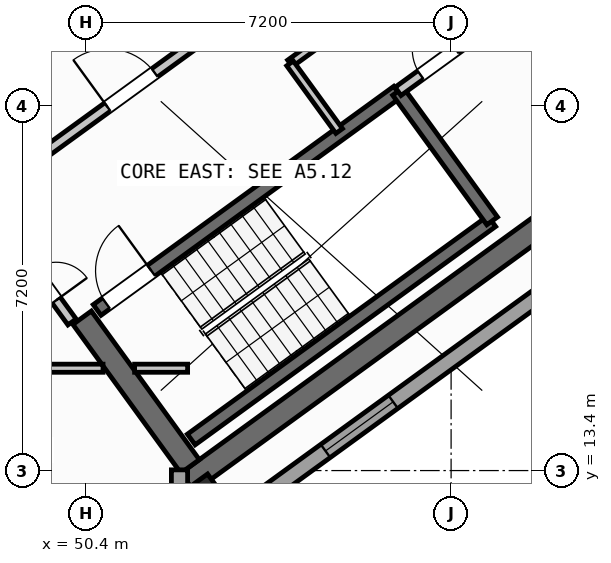
"""IFC4 building model, lengths in metres.
Left out: names, types, materials, properties, quantities, classifications, styles, units other than length and angle.
Written with IfcOpenShell. Run it as: python <this file> out.ifc"""

import sys

from ifc_helpers import new_model, si_unit, direction, frame, frame_2d, origin, origin_2d, place, context, subcontext, project, spatial, rectangle, hollow_rectangle, extrude, source, transform, mapped, element, fill, save


model = new_model("IFC4")
c1 = context("Model", 3, precision=1e-05, world=origin(), true_north=direction((0.0, 1.0)))
c2 = subcontext(c1, "Body", "Model", "MODEL_VIEW")
j1 = project(units=[si_unit("LENGTHUNIT", "METRE"), si_unit("PLANEANGLEUNIT", "RADIAN")], contexts=[c1])
p1 = place(None, origin())
s1 = spatial("IfcSite", under=j1, at=p1, CompositionType="ELEMENT")
p2 = place(p1, origin())
s2 = spatial("IfcBuilding", under=s1, at=p2, CompositionType="ELEMENT")
p3 = place(p2, frame((0.0, 0.0, 214.8)))
s3 = spatial("IfcBuildingStorey", under=s2, at=p3, CompositionType="ELEMENT", Elevation=214.8)
p4 = place(p3, frame((52.399, 13.169, 0.0), z_axis=(0.0, 0.0, 1.0), x_axis=(0.809022352778, 0.587777877013, 0.0)))
e1 = element("IfcWall", 1, at=p4, inside=s3, PredefinedType="SHEAR", context=c2, shape_type="SweptSolid", body=[
    extrude(rectangle(XDim=12.24, YDim=0.45, at=frame_2d((6.12, 0.0))), origin(), (0.0, 0.0, 1.0), 3.35),
])
p5 = place(p3, frame((52.449, 13.483, 0.0), z_axis=(0.0, 0.0, 1.0), x_axis=(-0.587819244441, 0.808992296542, 0.0)))
e2 = element("IfcWall", 2, at=p5, inside=s3, PredefinedType="SHEAR", context=c2, shape_type="SweptSolid", body=[
    extrude(rectangle(XDim=3.625, YDim=0.45, at=frame_2d((1.812, 0.0))), origin(), (0.0, 0.0, 1.0), 3.35),
])
m1 = source(origin(), c2, "Body", "SweptSolid", [
    extrude(hollow_rectangle(XDim=0.8, YDim=0.8, WallThickness=0.032, at=origin_2d()), origin(), (0.0, 0.0, 1.0), 3.6),
])
p6 = place(p3, frame((52.705, 12.773, 0.0), z_axis=(0.0, 0.0, 1.0), x_axis=(0.809016994375, 0.587785252292, 0.0)))
e3 = element("IfcColumn", 3, at=p6, inside=s3, PredefinedType="COLUMN", context=c2, shape_type="MappedRepresentation", body=[
    mapped(m1, transform((0.0, 0.0, 0.0), scale=1.0)),
])
p7 = place(p3, frame((67.454, 22.747, 0.0), z_axis=(0.0, 0.0, 1.0), x_axis=(-0.809021120468, -0.587779573171, 0.0)))
e4 = element("IfcWall", 4, at=p7, inside=s3, PredefinedType="STANDARD", context=c2, shape_type="SweptSolid", body=[
    extrude(rectangle(XDim=17.588, YDim=0.32, at=frame_2d((8.794, 0.0))), origin(), (0.0, 0.0, 1.0), 3.35),
])
p8 = place(p7, frame((1.624, 0.0, 0.0)))
e5 = element("IfcOpeningElement", 5, at=p8, cuts=e4, PredefinedType="OPENING", context=c2, shape_type="SweptSolid", body=[
    extrude(rectangle(XDim=1.05, YDim=2.15, at=frame_2d((0.525, 1.075))), frame((0.0, 0.17, 0.0), z_axis=(0.0, -1.0, 0.0), x_axis=(1.0, 0.0, 0.0)), (0.0, 0.0, 1.0), 0.34),
])
p9 = place(p7, frame((8.344, 0.0, 0.9)))
e6 = element("IfcOpeningElement", 6, at=p9, cuts=e4, PredefinedType="OPENING", context=c2, shape_type="SweptSolid", body=[
    extrude(rectangle(XDim=1.65, YDim=1.45, at=frame_2d((0.825, 0.725))), frame((0.0, 0.17, 0.0), z_axis=(0.0, -1.0, 0.0), x_axis=(1.0, 0.0, 0.0)), (0.0, 0.0, 1.0), 0.34),
])
p10 = place(p7, frame((13.594, 0.0, 0.9)))
e7 = element("IfcOpeningElement", 7, at=p10, cuts=e4, PredefinedType="OPENING", context=c2, shape_type="SweptSolid", body=[
    extrude(rectangle(XDim=1.65, YDim=1.45, at=frame_2d((0.825, 0.725))), frame((0.0, 0.17, 0.0), z_axis=(0.0, -1.0, 0.0), x_axis=(1.0, 0.0, 0.0)), (0.0, 0.0, 1.0), 0.34),
])
p11 = place(p3, frame((52.24, 13.414, 0.0), z_axis=(0.0, 0.0, 1.0), x_axis=(0.0, -1.0, 0.0)))
e8 = element("IfcWall", 8, at=p11, inside=s3, PredefinedType="STANDARD", context=c2, shape_type="SweptSolid", body=[
    extrude(rectangle(XDim=9.948, YDim=0.32, at=frame_2d((4.974, 0.0))), origin(), (0.0, 0.0, 1.0), 3.35),
])
p12 = place(p11, frame((3.287, 0.0, 0.9)))
e9 = element("IfcOpeningElement", 9, at=p12, cuts=e8, PredefinedType="OPENING", context=c2, shape_type="SweptSolid", body=[
    extrude(rectangle(XDim=1.65, YDim=1.45, at=frame_2d((0.825, 0.725))), frame((0.0, 0.17, 0.0), z_axis=(0.0, -1.0, 0.0), x_axis=(1.0, 0.0, 0.0)), (0.0, 0.0, 1.0), 0.34),
])
p13 = place(p11, frame((7.808, 0.0, 0.9)))
e10 = element("IfcOpeningElement", 10, at=p13, cuts=e8, PredefinedType="OPENING", context=c2, shape_type="SweptSolid", body=[
    extrude(rectangle(XDim=1.35, YDim=1.45, at=frame_2d((0.675, 0.725))), frame((0.0, 0.17, 0.0), z_axis=(0.0, -1.0, 0.0), x_axis=(1.0, 0.0, 0.0)), (0.0, 0.0, 1.0), 0.34),
])
p14 = place(p3, frame((52.472, 14.013, 0.0), z_axis=(0.0, 0.0, 1.0), x_axis=(0.809028366311, 0.587769599847, 0.0)))
e11 = element("IfcWall", 11, at=p14, inside=s3, PredefinedType="SHEAR", context=c2, shape_type="SweptSolid", body=[
    extrude(rectangle(XDim=7.33, YDim=0.26, at=frame_2d((3.665, 0.0))), origin(), (0.0, 0.0, 1.0), 3.35),
])
p15 = place(p3, frame((50.615, 16.57, 0.0), z_axis=(0.0, 0.0, 1.0), x_axis=(0.809028366311, 0.587769599847, 0.0)))
e12 = element("IfcWall", 12, at=p15, inside=s3, PredefinedType="SHEAR", context=c2, shape_type="SweptSolid", body=[
    extrude(rectangle(XDim=7.33, YDim=0.26, at=frame_2d((3.665, 0.0))), origin(), (0.0, 0.0, 1.0), 3.35),
])
p16 = place(p15, frame((0.22, 0.0, 0.0)))
e13 = element("IfcOpeningElement", 13, at=p16, cuts=e12, PredefinedType="OPENING", context=c2, shape_type="SweptSolid", body=[
    extrude(rectangle(XDim=1.1, YDim=2.1, at=frame_2d((0.55, 1.05))), frame((0.0, 0.14, 0.0), z_axis=(0.0, -1.0, 0.0), x_axis=(1.0, 0.0, 0.0)), (0.0, 0.0, 1.0), 0.28),
])
p17 = place(p3, frame((58.41, 18.327, 0.0), z_axis=(0.0, 0.0, 1.0), x_axis=(-0.58776738483, 0.809029975545, 0.0)))
e14 = element("IfcWall", 14, at=p17, inside=s3, PredefinedType="SHEAR", context=c2, shape_type="SweptSolid", body=[
    extrude(rectangle(XDim=3.16, YDim=0.26, at=frame_2d((1.58, 0.0))), origin(), (0.0, 0.0, 1.0), 3.35),
])
p18 = place(p3, frame((47.025, 21.378, 0.0), z_axis=(0.0, 0.0, 1.0), x_axis=(0.809052869724, 0.587735870941, 0.0)))
e15 = element("IfcWall", 15, at=p18, inside=s3, PredefinedType="STANDARD", context=c2, shape_type="SweptSolid", body=[
    extrude(rectangle(XDim=3.498, YDim=0.2, at=frame_2d((1.749, 0.0))), origin(), (0.0, 0.0, 1.0), 3.34),
])
p19 = place(p18, frame((0.508, 0.0, 0.0)))
e16 = element("IfcOpeningElement", 16, at=p19, cuts=e15, PredefinedType="OPENING", context=c2, shape_type="SweptSolid", body=[
    extrude(rectangle(XDim=1.3, YDim=2.2, at=frame_2d((0.65, 1.1))), frame((0.0, 0.11, 0.0), z_axis=(0.0, -1.0, 0.0), x_axis=(1.0, 0.0, 0.0)), (0.0, 0.0, 1.0), 0.22),
])
p20 = place(p3, frame((48.718, 19.048, 0.0), z_axis=(0.0, 0.0, 1.0), x_axis=(0.809017261719, 0.587784884325, 0.0)))
e17 = element("IfcWall", 17, at=p20, inside=s3, PredefinedType="STANDARD", context=c2, shape_type="SweptSolid", body=[
    extrude(rectangle(XDim=5.818, YDim=0.2, at=frame_2d((2.909, 0.0))), origin(), (0.0, 0.0, 1.0), 3.34),
])
p21 = place(p20, frame((2.598, 0.0, 0.0)))
e18 = element("IfcOpeningElement", 18, at=p21, cuts=e17, PredefinedType="OPENING", context=c2, shape_type="SweptSolid", body=[
    extrude(rectangle(XDim=1.15, YDim=2.1, at=frame_2d((0.575, 1.05))), frame((0.0, 0.11, 0.0), z_axis=(0.0, -1.0, 0.0), x_axis=(1.0, 0.0, 0.0)), (0.0, 0.0, 1.0), 0.22),
])
p22 = place(p3, frame((56.553, 20.884, 0.0), z_axis=(0.0, 0.0, 1.0), x_axis=(0.809041669066, 0.587751288995, 0.0)))
e19 = element("IfcWall", 19, at=p22, inside=s3, PredefinedType="STANDARD", context=c2, shape_type="SweptSolid", body=[
    extrude(rectangle(XDim=3.868, YDim=0.2, at=frame_2d((1.934, 0.0))), origin(), (0.0, 0.0, 1.0), 3.34),
])
p23 = place(p22, frame((0.55, 0.0, 0.0)))
e20 = element("IfcOpeningElement", 20, at=p23, cuts=e19, PredefinedType="OPENING", context=c2, shape_type="SweptSolid", body=[
    extrude(rectangle(XDim=0.86, YDim=2.05, at=frame_2d((0.43, 1.025))), frame((0.0, 0.11, 0.0), z_axis=(0.0, -1.0, 0.0), x_axis=(1.0, 0.0, 0.0)), (0.0, 0.0, 1.0), 0.22),
])
p24 = place(p3, frame((54.421, 21.436, 0.0), z_axis=(0.0, 0.0, 1.0), x_axis=(0.809013710463, 0.587789772183, 0.0)))
e21 = element("IfcWall", 21, at=p24, inside=s3, PredefinedType="PARTITIONING", context=c2, shape_type="SweptSolid", body=[
    extrude(rectangle(XDim=5.36, YDim=0.16, at=frame_2d((2.68, 0.0))), origin(), (0.0, 0.0, 1.0), 3.34),
])
p25 = place(p24, frame((1.4, 0.0, 0.0)))
e22 = element("IfcOpeningElement", 22, at=p25, cuts=e21, PredefinedType="OPENING", context=c2, shape_type="SweptSolid", body=[
    extrude(rectangle(XDim=0.86, YDim=2.05, at=frame_2d((0.43, 1.025))), frame((0.0, 0.09, 0.0), z_axis=(0.0, -1.0, 0.0), x_axis=(1.0, 0.0, 0.0)), (0.0, 0.0, 1.0), 0.18),
])
p26 = place(p3, frame((55.391, 20.102, 0.0), z_axis=(0.0, 0.0, 1.0), x_axis=(-0.58778447739, 0.809017557374, 0.0)))
e23 = element("IfcWall", 23, at=p26, inside=s3, PredefinedType="PARTITIONING", context=c2, shape_type="SweptSolid", body=[
    extrude(rectangle(XDim=1.65, YDim=0.16, at=frame_2d((0.825, 0.0))), origin(), (0.0, 0.0, 1.0), 3.34),
])
p27 = place(p3, frame((35.178, 15.42, 0.0), z_axis=(0.0, 0.0, 1.0), x_axis=(1.0, 0.0, 0.0)))
e24 = element("IfcWall", 24, at=p27, inside=s3, PredefinedType="PARTITIONING", context=c2, shape_type="SweptSolid", body=[
    extrude(rectangle(XDim=15.552, YDim=0.16, at=frame_2d((7.776, 0.0))), origin(), (0.0, 0.0, 1.0), 3.34),
])
p28 = place(p27, frame((3.885, 0.0, 0.0)))
e25 = element("IfcOpeningElement", 25, at=p28, cuts=e24, PredefinedType="OPENING", context=c2, shape_type="SweptSolid", body=[
    extrude(rectangle(XDim=1.0, YDim=2.1, at=frame_2d((0.5, 1.05))), frame((0.0, 0.09, 0.0), z_axis=(0.0, -1.0, 0.0), x_axis=(1.0, 0.0, 0.0)), (0.0, 0.0, 1.0), 0.18),
])
p29 = place(p3, frame((51.354, 15.42, 0.0), z_axis=(0.0, 0.0, 1.0), x_axis=(1.0, 0.0, 0.0)))
e26 = element("IfcWall", 26, at=p29, inside=s3, PredefinedType="PARTITIONING", context=c2, shape_type="SweptSolid", body=[
    extrude(rectangle(XDim=1.046, YDim=0.16, at=frame_2d((0.523, 0.0))), origin(), (0.0, 0.0, 1.0), 3.34),
])
p30 = place(p3, frame((50.119, 16.333, 0.0), z_axis=(0.0, 0.0, 1.0), x_axis=(-0.587749856981, 0.809042709391, 0.0)))
e27 = element("IfcWall", 27, at=p30, inside=s3, PredefinedType="STANDARD", context=c2, shape_type="SweptSolid", body=[
    extrude(rectangle(XDim=2.96, YDim=0.2, at=frame_2d((1.48, 0.0))), origin(), (0.0, 0.0, 1.0), 3.34),
])
p31 = place(p30, frame((0.53, 0.0, 0.0)))
e28 = element("IfcOpeningElement", 28, at=p31, cuts=e27, PredefinedType="OPENING", context=c2, shape_type="SweptSolid", body=[
    extrude(rectangle(XDim=1.5, YDim=2.15, at=frame_2d((0.75, 1.075))), frame((0.0, 0.11, 0.0), z_axis=(0.0, -1.0, 0.0), x_axis=(1.0, 0.0, 0.0)), (0.0, 0.0, 1.0), 0.22),
])
m2 = source(origin(), c2, "Body", "SweptSolid", [
    extrude(rectangle(XDim=1.65, YDim=1.45, at=frame_2d((0.825, 0.725))), frame((0.0, 0.03, 0.0), z_axis=(0.0, -1.0, 0.0), x_axis=(1.0, 0.0, 0.0)), (0.0, 0.0, 1.0), 0.06),
])
p32 = place(p10, origin())
e29 = element("IfcWindow", 29, at=p32, inside=s3, PartitioningType="SINGLE_PANEL", PredefinedType="WINDOW", context=c2, shape_type="MappedRepresentation", body=[
    mapped(m2, transform((0.0, 0.0, 0.0), scale=1.0)),
])
fill(e7, e29)
m3 = source(origin(), c2, "Body", "SweptSolid", [
    extrude(rectangle(XDim=1.1, YDim=2.1, at=frame_2d((0.55, 1.05))), frame((0.0, 0.025, 0.0), z_axis=(0.0, -1.0, 0.0), x_axis=(1.0, 0.0, 0.0)), (0.0, 0.0, 1.0), 0.05),
])
p33 = place(p16, origin())
e30 = element("IfcDoor", 30, at=p33, inside=s3, OperationType="SINGLE_SWING_RIGHT", PredefinedType="DOOR", context=c2, shape_type="MappedRepresentation", body=[
    mapped(m3, transform((0.0, 0.0, 0.0), scale=1.0)),
])
fill(e13, e30)
m4 = source(origin(), c2, "Body", "SweptSolid", [
    extrude(rectangle(XDim=1.15, YDim=2.1, at=frame_2d((0.575, 1.05))), frame((0.0, 0.025, 0.0), z_axis=(0.0, -1.0, 0.0), x_axis=(1.0, 0.0, 0.0)), (0.0, 0.0, 1.0), 0.05),
])
p34 = place(p21, origin())
e31 = element("IfcDoor", 31, at=p34, inside=s3, OperationType="SINGLE_SWING_LEFT", PredefinedType="DOOR", context=c2, shape_type="MappedRepresentation", body=[
    mapped(m4, transform((0.0, 0.0, 0.0), scale=1.0)),
])
fill(e18, e31)
m5 = source(origin(), c2, "Body", "SweptSolid", [
    extrude(rectangle(XDim=0.86, YDim=2.05, at=frame_2d((0.43, 1.025))), frame((0.0, 0.025, 0.0), z_axis=(0.0, -1.0, 0.0), x_axis=(1.0, 0.0, 0.0)), (0.0, 0.0, 1.0), 0.05),
])
p35 = place(p23, origin())
e32 = element("IfcDoor", 32, at=p35, inside=s3, OperationType="SINGLE_SWING_RIGHT", PredefinedType="DOOR", context=c2, shape_type="MappedRepresentation", body=[
    mapped(m5, transform((0.0, 0.0, 0.0), scale=1.0)),
])
fill(e20, e32)
m6 = source(origin(), c2, "Body", "SweptSolid", [
    extrude(rectangle(XDim=1.5, YDim=2.15, at=frame_2d((0.75, 1.075))), frame((0.0, 0.025, 0.0), z_axis=(0.0, -1.0, 0.0), x_axis=(1.0, 0.0, 0.0)), (0.0, 0.0, 1.0), 0.05),
])
p36 = place(p31, frame((1.5, 0.0, 0.0), z_axis=(0.0, 0.0, 1.0), x_axis=(-1.0, 0.0, 0.0)))
e33 = element("IfcDoor", 33, at=p36, inside=s3, OperationType="DOUBLE_DOOR_SINGLE_SWING", PredefinedType="DOOR", context=c2, shape_type="MappedRepresentation", body=[
    mapped(m6, transform((0.0, 0.0, 0.0), scale=1.0)),
])
fill(e28, e33)
save(model, sys.argv[1])
